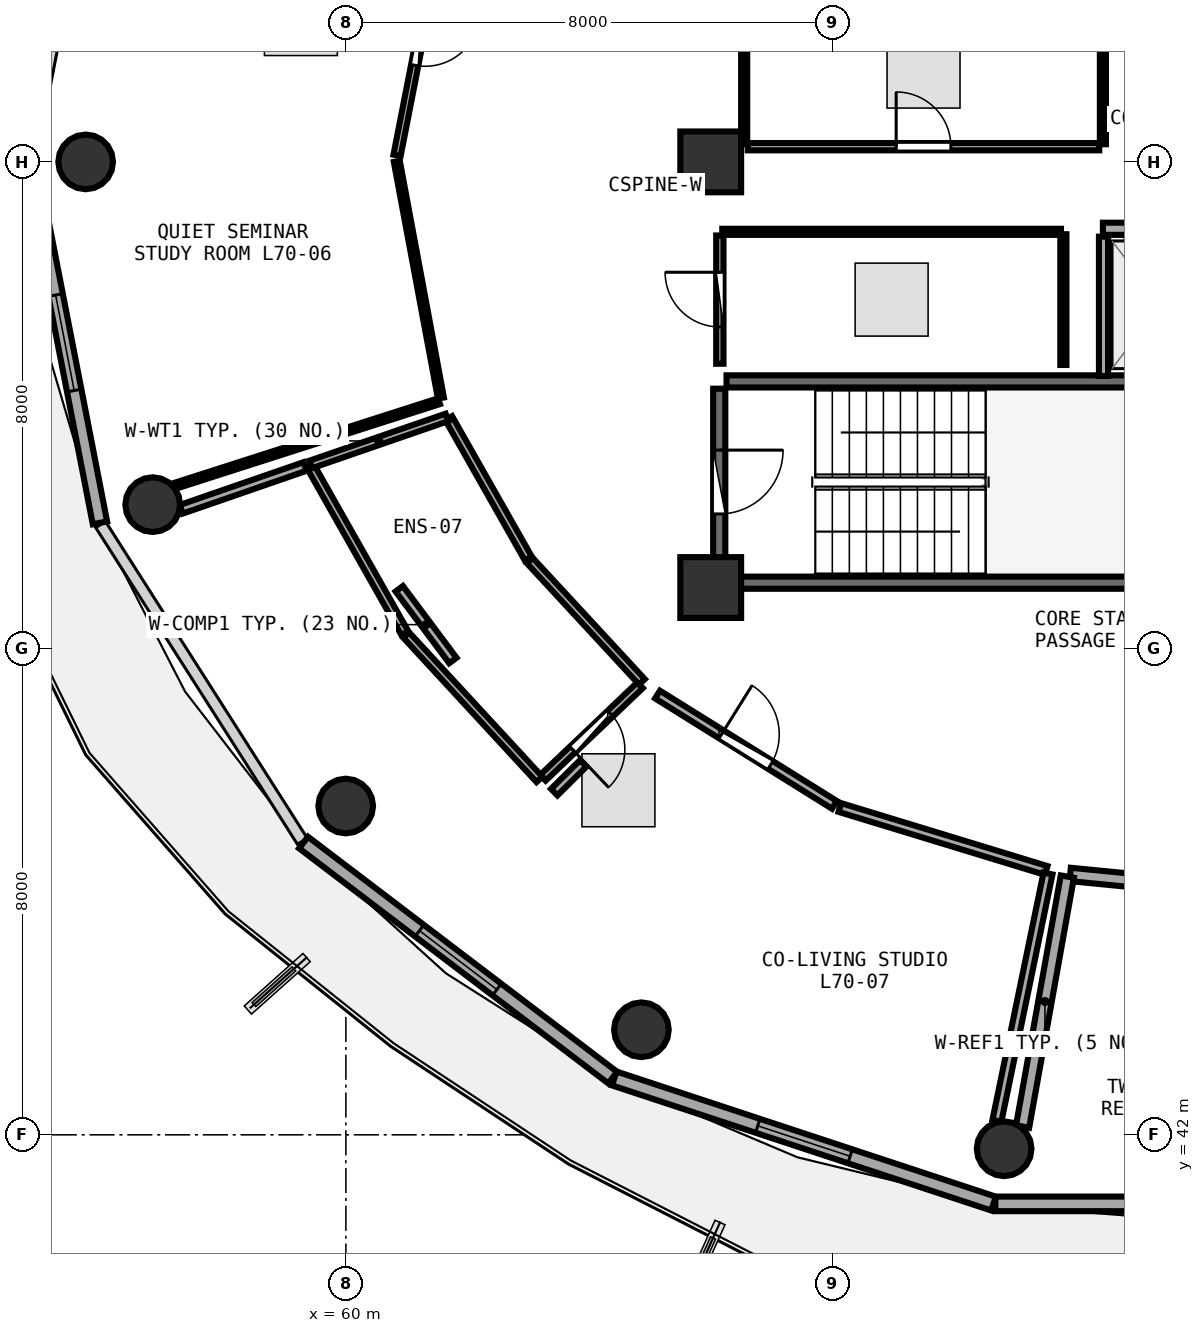
"""IFC4 building model, lengths in metres.
Left out: names, types, materials, properties, quantities, classifications, styles, units other than length and angle.
Written with IfcOpenShell. Run it as: python <this file> out.ifc"""

import sys

from ifc_helpers import new_model, si_unit, direction, frame, frame_2d, origin, origin_2d, place, context, subcontext, project, spatial, rectangle, circle, extrude, element, fill, save


model = new_model("IFC4")
c1 = context("Model", 3, precision=1e-05, world=origin(), true_north=direction((0.0, 1.0)))
c2 = subcontext(c1, "Body", "Model", "MODEL_VIEW")
j1 = project(units=[si_unit("LENGTHUNIT", "METRE"), si_unit("PLANEANGLEUNIT", "RADIAN")], contexts=[c1])
p1 = place(None, origin())
s1 = spatial("IfcSite", under=j1, at=p1, CompositionType="ELEMENT")
p2 = place(p1, origin())
s2 = spatial("IfcBuilding", under=s1, at=p2, CompositionType="ELEMENT")
p3 = place(p2, frame((0.0, 0.0, 274.95)))
s3 = spatial("IfcBuildingStorey", under=s2, at=p3, CompositionType="ELEMENT", Elevation=274.95)
for number, where, z_axis, x_axis in (
    (1, (66.0, 51.0, 0.0), (0.0, 0.0, 1.0), (1.0, 0.0, 0.0)),
    (2, (66.0, 58.0, 0.0), (0.0, 0.0, 1.0), (1.0, 0.0, 0.0)),
):
    element("IfcColumn", number, at=place(p3, frame(where, z_axis=z_axis, x_axis=x_axis)), inside=s3, PredefinedType="PILASTER", context=c2, shape_type="SweptSolid", body=[
        extrude(rectangle(XDim=1.0, YDim=1.0, at=origin_2d()), origin(), (0.0, 0.0, 1.0), 3.75),
    ])
for number, where, z_axis, x_axis in (
    (3, (55.72, 58.0, 0.0), (0.0, 0.0, 1.0), (1.0, 0.0, 0.0)),
    (4, (56.823, 52.364, 0.0), (0.0, 0.0, 1.0), (1.0, 0.0, 0.0)),
    (5, (59.997, 47.407, 0.0), (0.0, 0.0, 1.0), (1.0, 0.0, 0.0)),
    (6, (64.86, 43.728, 0.0), (0.0, 0.0, 1.0), (1.0, 0.0, 0.0)),
    (7, (70.826, 41.771, 0.0), (0.0, 0.0, 1.0), (1.0, 0.0, 0.0)),
):
    element("IfcColumn", number, at=place(p3, frame(where, z_axis=z_axis, x_axis=x_axis)), inside=s3, PredefinedType="COLUMN", context=c2, shape_type="SweptSolid", body=[
        extrude(circle(Radius=0.45, at=origin_2d()), origin(), (0.0, 0.0, 1.0), 3.75),
    ])
p4 = place(p3, frame((54.803, 57.985, 0.0), z_axis=(0.0, 0.0, 1.0), x_axis=(0.190969309115, -0.981596008028, 0.0)))
e8 = element("IfcWall", 8, at=p4, inside=s3, PredefinedType="SOLIDWALL", context=c2, shape_type="SweptSolid", body=[
    extrude(rectangle(XDim=6.033, YDim=0.24, at=frame_2d((3.017, 0.0))), origin(), (0.0, 0.0, 1.0), 3.475),
])
p5 = place(p4, frame((2.216, 0.0, 0.85)))
e9 = element("IfcOpeningElement", 9, at=p5, cuts=e8, PredefinedType="OPENING", context=c2, shape_type="SweptSolid", body=[
    extrude(rectangle(XDim=1.6, YDim=1.45, at=frame_2d((0.8, 0.725))), frame((0.0, 0.13, 0.0), z_axis=(0.0, -1.0, 0.0), x_axis=(1.0, 0.0, 0.0)), (0.0, 0.0, 1.0), 0.26),
])
p6 = place(p3, frame((59.304, 46.806, 0.0), z_axis=(0.0, 0.0, 1.0), x_axis=(0.796010444211, -0.605282886514, 0.0)))
e10 = element("IfcWall", 10, at=p6, inside=s3, PredefinedType="SOLIDWALL", context=c2, shape_type="SweptSolid", body=[
    extrude(rectangle(XDim=6.387, YDim=0.24, at=frame_2d((3.194, 0.0))), origin(), (0.0, 0.0, 1.0), 3.475),
])
p7 = place(p6, frame((2.394, 0.0, 0.85)))
e11 = element("IfcOpeningElement", 11, at=p7, cuts=e10, PredefinedType="OPENING", context=c2, shape_type="SweptSolid", body=[
    extrude(rectangle(XDim=1.6, YDim=1.45, at=frame_2d((0.8, 0.725))), frame((0.0, 0.13, 0.0), z_axis=(0.0, -1.0, 0.0), x_axis=(1.0, 0.0, 0.0)), (0.0, 0.0, 1.0), 0.26),
])
p8 = place(p3, frame((64.414, 42.927, 0.0), z_axis=(0.0, 0.0, 1.0), x_axis=(0.949663708393, -0.313271193954, 0.0)))
e12 = element("IfcWall", 12, at=p8, inside=s3, PredefinedType="SOLIDWALL", context=c2, shape_type="SweptSolid", body=[
    extrude(rectangle(XDim=6.568, YDim=0.24, at=frame_2d((3.284, 0.0))), origin(), (0.0, 0.0, 1.0), 3.475),
])
p9 = place(p8, frame((2.484, 0.0, 0.85)))
e13 = element("IfcOpeningElement", 13, at=p9, cuts=e12, PredefinedType="OPENING", context=c2, shape_type="SweptSolid", body=[
    extrude(rectangle(XDim=1.6, YDim=1.45, at=frame_2d((0.8, 0.725))), frame((0.0, 0.13, 0.0), z_axis=(0.0, -1.0, 0.0), x_axis=(1.0, 0.0, 0.0)), (0.0, 0.0, 1.0), 0.26),
])
p10 = place(p3, frame((70.681, 40.864, 0.0), z_axis=(0.0, 0.0, 1.0), x_axis=(1.0, 0.0, 0.0)))
e14 = element("IfcWall", 14, at=p10, inside=s3, PredefinedType="SOLIDWALL", context=c2, shape_type="SweptSolid", body=[
    extrude(rectangle(XDim=6.638, YDim=0.24, at=frame_2d((3.319, 0.0))), origin(), (0.0, 0.0, 1.0), 3.475),
])
p11 = place(p10, frame((2.519, 0.0, 0.85)))
e15 = element("IfcOpeningElement", 15, at=p11, cuts=e14, PredefinedType="OPENING", context=c2, shape_type="SweptSolid", body=[
    extrude(rectangle(XDim=1.6, YDim=1.45, at=frame_2d((0.8, 0.725))), frame((0.0, 0.13, 0.0), z_axis=(0.0, -1.0, 0.0), x_axis=(1.0, 0.0, 0.0)), (0.0, 0.0, 1.0), 0.26),
])
for number, where, z_axis, x_axis in (
    (16, (66.26, 51.08, 0.0), (0.0, 0.0, 1.0), (1.0, 0.0, 0.0)),
    (17, (73.42, 54.39, 0.0), (0.0, 0.0, 1.0), (-1.0, 0.0, 0.0)),
):
    element("IfcWall", number, at=place(p3, frame(where, z_axis=z_axis, x_axis=x_axis)), inside=s3, PredefinedType="SHEAR", context=c2, shape_type="SweptSolid", body=[
        extrude(rectangle(XDim=7.16, YDim=0.2, at=frame_2d((3.58, 0.0))), origin(), (0.0, 0.0, 1.0), 3.49),
    ])
p12 = place(p3, frame((66.14, 54.27, 0.0), z_axis=(0.0, 0.0, 1.0), x_axis=(0.0, -1.0, 0.0)))
e18 = element("IfcWall", 18, at=p12, inside=s3, PredefinedType="SHEAR", context=c2, shape_type="SweptSolid", body=[
    extrude(rectangle(XDim=3.07, YDim=0.2, at=frame_2d((1.535, 0.0))), origin(), (0.0, 0.0, 1.0), 3.49),
])
p13 = place(p12, frame((1.01, 0.0, 0.0)))
e19 = element("IfcOpeningElement", 19, at=p13, cuts=e18, PredefinedType="OPENING", context=c2, shape_type="SweptSolid", body=[
    extrude(rectangle(XDim=1.05, YDim=2.1, at=frame_2d((0.525, 1.05))), frame((0.0, 0.11, 0.0), z_axis=(0.0, -1.0, 0.0), x_axis=(1.0, 0.0, 0.0)), (0.0, 0.0, 1.0), 0.22),
])
p14 = place(p3, frame((72.45, 56.9, 0.0), z_axis=(0.0, 0.0, 1.0), x_axis=(1.0, 0.0, 0.0)))
e20 = element("IfcWall", 20, at=p14, inside=s3, PredefinedType="SOLIDWALL", context=c2, shape_type="SweptSolid", body=[
    extrude(rectangle(XDim=8.4, YDim=0.2, at=frame_2d((4.2, 0.0))), origin(), (0.0, 0.0, 1.0), 3.48),
])
p15 = place(p14, frame((0.4, 0.0, 0.0)))
e21 = element("IfcOpeningElement", 21, at=p15, cuts=e20, PredefinedType="OPENING", context=c2, shape_type="SweptSolid", body=[
    extrude(rectangle(XDim=1.1, YDim=2.1, at=frame_2d((0.55, 1.05))), frame((0.0, 0.11, 0.0), z_axis=(0.0, -1.0, 0.0), x_axis=(1.0, 0.0, 0.0)), (0.0, 0.0, 1.0), 0.22),
])
p16 = place(p14, frame((2.4, 0.0, 0.0)))
e22 = element("IfcOpeningElement", 22, at=p16, cuts=e20, PredefinedType="OPENING", context=c2, shape_type="SweptSolid", body=[
    extrude(rectangle(XDim=1.1, YDim=2.1, at=frame_2d((0.55, 1.05))), frame((0.0, 0.11, 0.0), z_axis=(0.0, -1.0, 0.0), x_axis=(1.0, 0.0, 0.0)), (0.0, 0.0, 1.0), 0.22),
])
p17 = place(p3, frame((72.46, 54.48, 0.0), z_axis=(0.0, 0.0, 1.0), x_axis=(0.0, 1.0, 0.0)))
e23 = element("IfcWall", 23, at=p17, inside=s3, PredefinedType="PARTITIONING", context=c2, shape_type="SweptSolid", body=[
    extrude(rectangle(XDim=2.29, YDim=0.15, at=frame_2d((1.145, 0.0))), origin(), (0.0, 0.0, 1.0), 3.48),
])
p18 = place(p3, frame((66.61, 58.25, 0.0), z_axis=(0.0, 0.0, 1.0), x_axis=(1.0, 0.0, 0.0)))
e24 = element("IfcWall", 24, at=p18, inside=s3, PredefinedType="PARTITIONING", context=c2, shape_type="SweptSolid", body=[
    extrude(rectangle(XDim=5.78, YDim=0.12, at=frame_2d((2.89, 0.0))), origin(), (0.0, 0.0, 1.0), 3.48),
])
p19 = place(p18, frame((2.44, 0.0, 0.0)))
e25 = element("IfcOpeningElement", 25, at=p19, cuts=e24, PredefinedType="OPENING", context=c2, shape_type="SweptSolid", body=[
    extrude(rectangle(XDim=0.9, YDim=2.08, at=frame_2d((0.45, 1.04))), frame((0.0, 0.07, 0.0), z_axis=(0.0, -1.0, 0.0), x_axis=(1.0, 0.0, 0.0)), (0.0, 0.0, 1.0), 0.14),
])
p20 = place(p3, frame((66.15, 54.68, 0.0), z_axis=(0.0, 0.0, 1.0), x_axis=(0.0, 1.0, 0.0)))
e26 = element("IfcWall", 26, at=p20, inside=s3, PredefinedType="PARTITIONING", context=c2, shape_type="SweptSolid", body=[
    extrude(rectangle(XDim=2.11, YDim=0.12, at=frame_2d((1.055, 0.0))), origin(), (0.0, 0.0, 1.0), 2.775),
])
p21 = place(p20, frame((0.605, 0.0, 0.0)))
e27 = element("IfcOpeningElement", 27, at=p21, cuts=e26, PredefinedType="OPENING", context=c2, shape_type="SweptSolid", body=[
    extrude(rectangle(XDim=0.9, YDim=2.08, at=frame_2d((0.45, 1.04))), frame((0.0, 0.07, 0.0), z_axis=(0.0, -1.0, 0.0), x_axis=(1.0, 0.0, 0.0)), (0.0, 0.0, 1.0), 0.14),
])
p22 = place(p3, frame((61.594, 61.955, 0.0), z_axis=(0.0, 0.0, 1.0), x_axis=(-0.192019428236, -0.981391124466, 0.0)))
e28 = element("IfcWall", 28, at=p22, inside=s3, PredefinedType="PARTITIONING", context=c2, shape_type="SweptSolid", body=[
    extrude(rectangle(XDim=3.921, YDim=0.12, at=frame_2d((1.96, 0.0))), origin(), (0.0, 0.0, 1.0), 3.075),
])
p23 = place(p22, frame((1.511, 0.0, 0.0)))
e29 = element("IfcOpeningElement", 29, at=p23, cuts=e28, PredefinedType="OPENING", context=c2, shape_type="SweptSolid", body=[
    extrude(rectangle(XDim=0.9, YDim=2.08, at=frame_2d((0.45, 1.04))), frame((0.0, 0.07, 0.0), z_axis=(0.0, -1.0, 0.0), x_axis=(1.0, 0.0, 0.0)), (0.0, 0.0, 1.0), 0.14),
])
p24 = place(p3, frame((64.839, 49.394, 0.0), z_axis=(0.0, 0.0, 1.0), x_axis=(-0.724098470775, -0.689696603313, 0.0)))
e30 = element("IfcWall", 30, at=p24, inside=s3, PredefinedType="PLUMBINGWALL", context=c2, shape_type="SweptSolid", body=[
    extrude(rectangle(XDim=2.207, YDim=0.13, at=frame_2d((1.104, 0.0))), origin(), (0.0, 0.0, 1.0), 3.175),
])
p25 = place(p24, frame((0.674, 0.0, 0.0)))
e31 = element("IfcOpeningElement", 31, at=p25, cuts=e30, PredefinedType="OPENING", context=c2, shape_type="SweptSolid", body=[
    extrude(rectangle(XDim=0.86, YDim=2.05, at=frame_2d((0.43, 1.025))), frame((0.0, 0.075, 0.0), z_axis=(0.0, -1.0, 0.0), x_axis=(1.0, 0.0, 0.0)), (0.0, 0.0, 1.0), 0.15),
])
p26 = place(p3, frame((65.125, 49.24, 0.0), z_axis=(0.0, 0.0, 1.0), x_axis=(0.848573714942, -0.529077168578, 0.0)))
e32 = element("IfcWall", 32, at=p26, inside=s3, PredefinedType="PARTITIONING", context=c2, shape_type="SweptSolid", body=[
    extrude(rectangle(XDim=3.429, YDim=0.15, at=frame_2d((1.715, 0.0))), origin(), (0.0, 0.0, 1.0), 3.075),
])
p27 = place(p26, frame((1.24, 0.0, 0.0)))
e33 = element("IfcOpeningElement", 33, at=p27, cuts=e32, PredefinedType="OPENING", context=c2, shape_type="SweptSolid", body=[
    extrude(rectangle(XDim=0.95, YDim=2.08, at=frame_2d((0.475, 1.04))), frame((0.0, 0.085, 0.0), z_axis=(0.0, -1.0, 0.0), x_axis=(1.0, 0.0, 0.0)), (0.0, 0.0, 1.0), 0.17),
])
for number, where, z_axis, x_axis in (
    (34, (72.45, 58.29, 0.0), (0.0, 0.0, 1.0), (0.0, 1.0, 0.0)),
    (35, (66.55, 60.68, 0.0), (0.0, 0.0, 1.0), (0.0, -1.0, 0.0)),
):
    element("IfcWall", number, at=place(p3, frame(where, z_axis=z_axis, x_axis=x_axis)), inside=s3, PredefinedType="PARTITIONING", context=c2, shape_type="SweptSolid", body=[
        extrude(rectangle(XDim=2.39, YDim=0.1, at=frame_2d((1.195, 0.0))), origin(), (0.0, 0.0, 1.0), 3.48),
    ])
p28 = place(p3, frame((71.8, 54.66, 0.0), z_axis=(0.0, 0.0, 1.0), x_axis=(0.0, 1.0, 0.0)))
e36 = element("IfcWall", 36, at=p28, inside=s3, PredefinedType="PARTITIONING", context=c2, shape_type="SweptSolid", body=[
    extrude(rectangle(XDim=2.15, YDim=0.1, at=frame_2d((1.075, 0.0))), origin(), (0.0, 0.0, 1.0), 3.48),
])
p29 = place(p3, frame((71.76, 56.85, 0.0), z_axis=(0.0, 0.0, 1.0), x_axis=(-1.0, 0.0, 0.0)))
e37 = element("IfcWall", 37, at=p29, inside=s3, PredefinedType="PARTITIONING", context=c2, shape_type="SweptSolid", body=[
    extrude(rectangle(XDim=5.57, YDim=0.1, at=frame_2d((2.785, 0.0))), origin(), (0.0, 0.0, 1.0), 2.775),
])
p30 = place(p3, frame((71.912, 46.282, 0.0), z_axis=(0.0, 0.0, 1.0), x_axis=(0.995222638402, -0.097631449913, 0.0)))
e38 = element("IfcWall", 38, at=p30, inside=s3, PredefinedType="SOLIDWALL", context=c2, shape_type="SweptSolid", body=[
    extrude(rectangle(XDim=1.343, YDim=0.22, at=frame_2d((0.671, 0.0))), origin(), (0.0, 0.0, 1.0), 3.075),
])
p31 = place(p3, frame((71.129, 42.136, 0.0), z_axis=(0.0, 0.0, 1.0), x_axis=(0.176199339585, 0.984354505618, 0.0)))
e39 = element("IfcWall", 39, at=p31, inside=s3, PredefinedType="SOLIDWALL", context=c2, shape_type="SweptSolid", body=[
    extrude(rectangle(XDim=4.176, YDim=0.22, at=frame_2d((2.088, 0.0))), origin(), (0.0, 0.0, 1.0), 3.075),
])
p32 = place(p3, frame((60.837, 58.009, 0.0), z_axis=(0.0, 0.0, 1.0), x_axis=(0.18318648267, -0.983078182327, 0.0)))
e40 = element("IfcWall", 40, at=p32, inside=s3, PredefinedType="PARTITIONING", context=c2, shape_type="SweptSolid", body=[
    extrude(rectangle(XDim=3.959, YDim=0.1, at=frame_2d((1.98, 0.0))), origin(), (0.0, 0.0, 1.0), 3.075),
])
p33 = place(p3, frame((61.532, 54.065, 0.0), z_axis=(0.0, 0.0, 1.0), x_axis=(-0.95227750557, -0.305233602976, 0.0)))
e41 = element("IfcWall", 41, at=p33, inside=s3, PredefinedType="PARTITIONING", context=c2, shape_type="SweptSolid", body=[
    extrude(rectangle(XDim=4.565, YDim=0.1, at=frame_2d((2.283, 0.0))), origin(), (0.0, 0.0, 1.0), 3.175),
])
p34 = place(p3, frame((61.69, 53.787, 0.0), z_axis=(0.0, 0.0, 1.0), x_axis=(0.493265362099, -0.86987888959, 0.0)))
e42 = element("IfcWall", 42, at=p34, inside=s3, PredefinedType="PLUMBINGWALL", context=c2, shape_type="SweptSolid", body=[
    extrude(rectangle(XDim=2.656, YDim=0.13, at=frame_2d((1.328, 0.0))), origin(), (0.0, 0.0, 1.0), 3.075),
])
p35 = place(p3, frame((63.024, 51.444, 0.0), z_axis=(0.0, 0.0, 1.0), x_axis=(0.678981447207, -0.734155429285, 0.0)))
e43 = element("IfcWall", 43, at=p35, inside=s3, PredefinedType="PLUMBINGWALL", context=c2, shape_type="SweptSolid", body=[
    extrude(rectangle(XDim=2.717, YDim=0.13, at=frame_2d((1.358, 0.0))), origin(), (0.0, 0.0, 1.0), 3.075),
])
p36 = place(p3, frame((63.183, 47.845, 0.0), z_axis=(0.0, 0.0, 1.0), x_axis=(-0.678233011032, 0.734846911095, 0.0)))
e44 = element("IfcWall", 44, at=p36, inside=s3, PredefinedType="PLUMBINGWALL", context=c2, shape_type="SweptSolid", body=[
    extrude(rectangle(XDim=3.23, YDim=0.13, at=frame_2d((1.615, 0.0))), origin(), (0.0, 0.0, 1.0), 3.075),
])
p37 = place(p3, frame((60.969, 50.25, 0.0), z_axis=(0.0, 0.0, 1.0), x_axis=(-0.492548536898, 0.870284975626, 0.0)))
e45 = element("IfcWall", 45, at=p37, inside=s3, PredefinedType="PLUMBINGWALL", context=c2, shape_type="SweptSolid", body=[
    extrude(rectangle(XDim=3.16, YDim=0.13, at=frame_2d((1.58, 0.0))), origin(), (0.0, 0.0, 1.0), 3.075),
])
p38 = place(p3, frame((59.422, 53.024, 0.0), z_axis=(0.0, 0.0, 1.0), x_axis=(0.945238193125, 0.326381308071, 0.0)))
e46 = element("IfcWall", 46, at=p38, inside=s3, PredefinedType="PLUMBINGWALL", context=c2, shape_type="SweptSolid", body=[
    extrude(rectangle(XDim=2.369, YDim=0.13, at=frame_2d((1.185, 0.0))), origin(), (0.0, 0.0, 1.0), 3.175),
])
p39 = place(p3, frame((68.124, 47.382, 0.0), z_axis=(0.0, 0.0, 1.0), x_axis=(0.956499471214, -0.291734059662, 0.0)))
e47 = element("IfcWall", 47, at=p39, inside=s3, PredefinedType="PARTITIONING", context=c2, shape_type="SweptSolid", body=[
    extrude(rectangle(XDim=3.547, YDim=0.15, at=frame_2d((1.773, 0.0))), origin(), (0.0, 0.0, 1.0), 3.48),
])
p40 = place(p3, frame((71.547, 46.297, 0.0), z_axis=(0.0, 0.0, 1.0), x_axis=(-0.202308141573, -0.979321916355, 0.0)))
e48 = element("IfcWall", 48, at=p40, inside=s3, PredefinedType="PARTITIONING", context=c2, shape_type="SweptSolid", body=[
    extrude(rectangle(XDim=4.153, YDim=0.15, at=frame_2d((2.076, 0.0))), origin(), (0.0, 0.0, 1.0), 3.175),
])
p41 = place(p3, frame((57.291, 52.287, 0.0), z_axis=(0.0, 0.0, 1.0), x_axis=(0.945101825102, 0.326775978598, 0.0)))
e49 = element("IfcWall", 49, at=p41, inside=s3, PredefinedType="PARTITIONING", context=c2, shape_type="SweptSolid", body=[
    extrude(rectangle(XDim=2.156, YDim=0.15, at=frame_2d((1.078, 0.0))), origin(), (0.0, 0.0, 1.0), 3.075),
])
p42 = place(p3, frame((60.878, 50.98, 0.0), z_axis=(0.0, 0.0, 1.0), x_axis=(0.598540360971, -0.801092651501, 0.0)))
e50 = element("IfcWall", 50, at=p42, inside=s3, PredefinedType="PARTITIONING", context=c2, shape_type="SweptSolid", body=[
    extrude(rectangle(XDim=1.473, YDim=0.15, at=frame_2d((0.736, 0.0))), origin(), (0.0, 0.0, 1.0), 3.175),
])
p43 = place(p3, frame((63.427, 47.635, 0.0), z_axis=(0.0, 0.0, 1.0), x_axis=(0.709466506809, 0.70473915438, 0.0)))
e51 = element("IfcWall", 51, at=p43, inside=s3, PredefinedType="PARTITIONING", context=c2, shape_type="SweptSolid", body=[
    extrude(rectangle(XDim=0.671, YDim=0.15, at=frame_2d((0.336, 0.0))), origin(), (0.0, 0.0, 1.0), 3.175),
])
p44 = place(p5, origin())
e52 = element("IfcWindow", 52, at=p44, inside=s3, PartitioningType="SINGLE_PANEL", PredefinedType="WINDOW", context=c2, shape_type="SweptSolid", body=[
    extrude(rectangle(XDim=1.6, YDim=1.45, at=frame_2d((0.8, 0.725))), frame((0.0, 0.03, 0.0), z_axis=(0.0, -1.0, 0.0), x_axis=(1.0, 0.0, 0.0)), (0.0, 0.0, 1.0), 0.06),
])
fill(e9, e52)
p45 = place(p7, origin())
e53 = element("IfcWindow", 53, at=p45, inside=s3, PartitioningType="SINGLE_PANEL", PredefinedType="WINDOW", context=c2, shape_type="SweptSolid", body=[
    extrude(rectangle(XDim=1.6, YDim=1.45, at=frame_2d((0.8, 0.725))), frame((0.0, 0.03, 0.0), z_axis=(0.0, -1.0, 0.0), x_axis=(1.0, 0.0, 0.0)), (0.0, 0.0, 1.0), 0.06),
])
fill(e11, e53)
p46 = place(p9, origin())
e54 = element("IfcWindow", 54, at=p46, inside=s3, PartitioningType="SINGLE_PANEL", PredefinedType="WINDOW", context=c2, shape_type="SweptSolid", body=[
    extrude(rectangle(XDim=1.6, YDim=1.45, at=frame_2d((0.8, 0.725))), frame((0.0, 0.03, 0.0), z_axis=(0.0, -1.0, 0.0), x_axis=(1.0, 0.0, 0.0)), (0.0, 0.0, 1.0), 0.06),
])
fill(e13, e54)
p47 = place(p13, origin())
e55 = element("IfcDoor", 55, at=p47, inside=s3, OperationType="SINGLE_SWING_LEFT", PredefinedType="DOOR", context=c2, shape_type="SweptSolid", body=[
    extrude(rectangle(XDim=1.05, YDim=2.1, at=frame_2d((0.525, 1.05))), frame((0.0, 0.025, 0.0), z_axis=(0.0, -1.0, 0.0), x_axis=(1.0, 0.0, 0.0)), (0.0, 0.0, 1.0), 0.05),
])
fill(e19, e55)
p48 = place(p19, origin())
e56 = element("IfcDoor", 56, at=p48, inside=s3, OperationType="SINGLE_SWING_LEFT", PredefinedType="DOOR", context=c2, shape_type="SweptSolid", body=[
    extrude(rectangle(XDim=0.9, YDim=2.08, at=frame_2d((0.45, 1.04))), frame((0.0, 0.025, 0.0), z_axis=(0.0, -1.0, 0.0), x_axis=(1.0, 0.0, 0.0)), (0.0, 0.0, 1.0), 0.05),
])
fill(e25, e56)
p49 = place(p21, origin())
e57 = element("IfcDoor", 57, at=p49, inside=s3, OperationType="SINGLE_SWING_RIGHT", PredefinedType="DOOR", context=c2, shape_type="SweptSolid", body=[
    extrude(rectangle(XDim=0.9, YDim=2.08, at=frame_2d((0.45, 1.04))), frame((0.0, 0.025, 0.0), z_axis=(0.0, -1.0, 0.0), x_axis=(1.0, 0.0, 0.0)), (0.0, 0.0, 1.0), 0.05),
])
fill(e27, e57)
p50 = place(p23, origin())
e58 = element("IfcDoor", 58, at=p50, inside=s3, OperationType="SINGLE_SWING_LEFT", PredefinedType="DOOR", context=c2, shape_type="SweptSolid", body=[
    extrude(rectangle(XDim=0.9, YDim=2.08, at=frame_2d((0.45, 1.04))), frame((0.0, 0.025, 0.0), z_axis=(0.0, -1.0, 0.0), x_axis=(1.0, 0.0, 0.0)), (0.0, 0.0, 1.0), 0.05),
])
fill(e29, e58)
p51 = place(p25, origin())
e59 = element("IfcDoor", 59, at=p51, inside=s3, OperationType="SINGLE_SWING_RIGHT", PredefinedType="DOOR", context=c2, shape_type="SweptSolid", body=[
    extrude(rectangle(XDim=0.86, YDim=2.05, at=frame_2d((0.43, 1.025))), frame((0.0, 0.025, 0.0), z_axis=(0.0, -1.0, 0.0), x_axis=(1.0, 0.0, 0.0)), (0.0, 0.0, 1.0), 0.05),
])
fill(e31, e59)
p52 = place(p27, origin())
e60 = element("IfcDoor", 60, at=p52, inside=s3, OperationType="SINGLE_SWING_LEFT", PredefinedType="DOOR", context=c2, shape_type="SweptSolid", body=[
    extrude(rectangle(XDim=0.95, YDim=2.08, at=frame_2d((0.475, 1.04))), frame((0.0, 0.025, 0.0), z_axis=(0.0, -1.0, 0.0), x_axis=(1.0, 0.0, 0.0)), (0.0, 0.0, 1.0), 0.05),
])
fill(e33, e60)
save(model, sys.argv[1])
